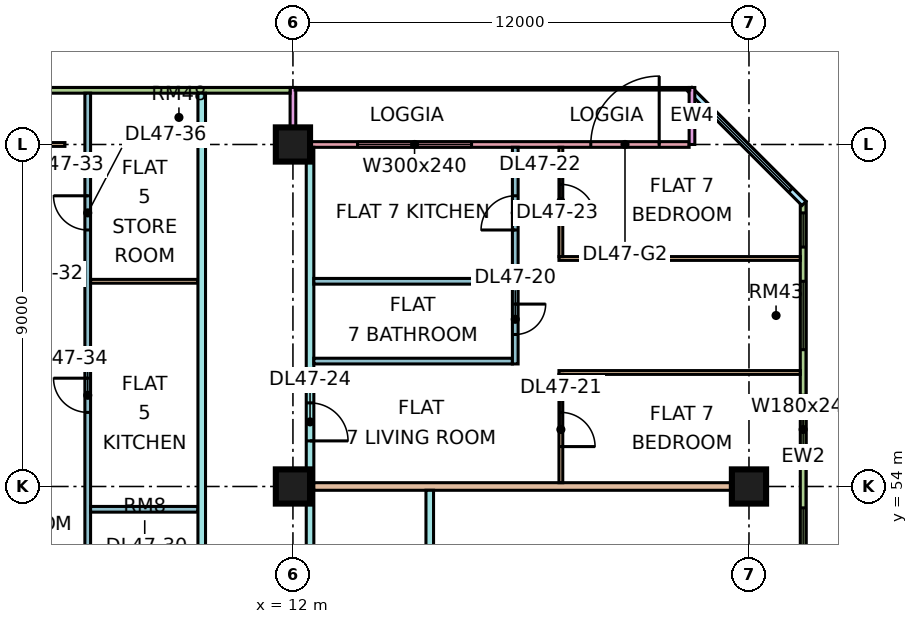
"""IFC4 building model, lengths in metres.
Left out: names, types, materials, properties, quantities, classifications, styles, units other than length and angle.
Written with IfcOpenShell. Run it as: python <this file> out.ifc"""

import sys

from ifc_helpers import new_model, si_unit, direction, frame, frame_2d, origin, origin_2d, place, context, subcontext, project, spatial, rectangle, extrude, element, fill, save


model = new_model("IFC4")
c1 = context("Model", 3, precision=1e-05, world=origin(), true_north=direction((0.0, 1.0)))
c2 = subcontext(c1, "Body", "Model", "MODEL_VIEW")
j1 = project(units=[si_unit("LENGTHUNIT", "METRE"), si_unit("PLANEANGLEUNIT", "RADIAN")], contexts=[c1])
p1 = place(None, origin())
s1 = spatial("IfcSite", under=j1, at=p1, CompositionType="ELEMENT")
p2 = place(p1, origin())
s2 = spatial("IfcBuilding", under=s1, at=p2, CompositionType="ELEMENT")
p3 = place(p2, frame((0.0, 0.0, 202.4)))
s3 = spatial("IfcBuildingStorey", under=s2, at=p3, CompositionType="ELEMENT", Elevation=202.4)
for number, where, z_axis, x_axis in (
    (1, (12.0, 54.0, 0.0), (0.0, 0.0, 1.0), (1.0, 0.0, 0.0)),
    (2, (12.0, 63.0, 0.0), (0.0, 0.0, 1.0), (1.0, 0.0, 0.0)),
    (3, (24.0, 54.0, 0.0), (0.0, 0.0, 1.0), (1.0, 0.0, 0.0)),
):
    element("IfcColumn", number, at=place(p3, frame(where, z_axis=z_axis, x_axis=x_axis)), inside=s3, PredefinedType="COLUMN", context=c2, shape_type="SweptSolid", body=[
        extrude(rectangle(XDim=0.9, YDim=0.9, at=origin_2d()), origin(), (0.0, 0.0, 1.0), 3.75),
    ])
p4 = place(p3, frame((25.425, 48.075, 0.0), z_axis=(0.0, 0.0, 1.0), x_axis=(0.0, 1.0, 0.0)))
e4 = element("IfcWall", 4, at=p4, inside=s3, PredefinedType="SOLIDWALL", context=c2, shape_type="SweptSolid", body=[
    extrude(rectangle(XDim=13.425, YDim=0.15, at=frame_2d((6.712, 0.0))), origin(), (0.0, 0.0, 1.0), 3.3),
])
p5 = place(p4, frame((0.562, 0.0, 0.45)))
e5 = element("IfcOpeningElement", 5, at=p5, cuts=e4, PredefinedType="OPENING", context=c2, shape_type="SweptSolid", body=[
    extrude(rectangle(XDim=4.8, YDim=2.4, at=frame_2d((2.4, 1.2))), frame((0.0, 0.085, 0.0), z_axis=(0.0, -1.0, 0.0), x_axis=(1.0, 0.0, 0.0)), (0.0, 0.0, 1.0), 0.17),
])
p6 = place(p4, frame((6.525, 0.0, 0.45)))
e6 = element("IfcOpeningElement", 6, at=p6, cuts=e4, PredefinedType="OPENING", context=c2, shape_type="SweptSolid", body=[
    extrude(rectangle(XDim=1.8, YDim=2.4, at=frame_2d((0.9, 1.2))), frame((0.0, 0.085, 0.0), z_axis=(0.0, -1.0, 0.0), x_axis=(1.0, 0.0, 0.0)), (0.0, 0.0, 1.0), 0.17),
])
p7 = place(p4, frame((9.525, 0.0, 0.45)))
e7 = element("IfcOpeningElement", 7, at=p7, cuts=e4, PredefinedType="OPENING", context=c2, shape_type="SweptSolid", body=[
    extrude(rectangle(XDim=1.8, YDim=2.4, at=frame_2d((0.9, 1.2))), frame((0.0, 0.085, 0.0), z_axis=(0.0, -1.0, 0.0), x_axis=(1.0, 0.0, 0.0)), (0.0, 0.0, 1.0), 0.17),
])
p8 = place(p4, frame((12.225, 0.0, 0.45)))
e8 = element("IfcOpeningElement", 8, at=p8, cuts=e4, PredefinedType="OPENING", context=c2, shape_type="SweptSolid", body=[
    extrude(rectangle(XDim=0.9, YDim=2.4, at=frame_2d((0.45, 1.2))), frame((0.0, 0.085, 0.0), z_axis=(0.0, -1.0, 0.0), x_axis=(1.0, 0.0, 0.0)), (0.0, 0.0, 1.0), 0.17),
])
p9 = place(p3, frame((25.447, 61.447, 0.0), z_axis=(0.0, 0.0, 1.0), x_axis=(-0.707106781187, 0.707106781187, 0.0)))
e9 = element("IfcWall", 9, at=p9, inside=s3, PredefinedType="SOLIDWALL", context=c2, shape_type="SweptSolid", body=[
    extrude(rectangle(XDim=4.243, YDim=0.15, at=frame_2d((2.121, 0.0))), origin(), (0.0, 0.0, 1.0), 3.3),
])
p10 = place(p9, frame((0.498, 0.0, 0.45)))
e10 = element("IfcOpeningElement", 10, at=p10, cuts=e9, PredefinedType="OPENING", context=c2, shape_type="SweptSolid", body=[
    extrude(rectangle(XDim=3.0, YDim=2.4, at=frame_2d((1.5, 1.2))), frame((0.0, 0.085, 0.0), z_axis=(0.0, -1.0, 0.0), x_axis=(1.0, 0.0, 0.0)), (0.0, 0.0, 1.0), 0.17),
])
p11 = place(p3, frame((22.425, 63.0, 0.0), z_axis=(0.0, 0.0, 1.0), x_axis=(-1.0, 0.0, 0.0)))
e11 = element("IfcWall", 11, at=p11, inside=s3, PredefinedType="SOLIDWALL", context=c2, shape_type="SweptSolid", body=[
    extrude(rectangle(XDim=10.35, YDim=0.15, at=frame_2d((5.175, 0.0))), origin(), (0.0, 0.0, 1.0), 3.3),
])
p12 = place(p11, frame((0.788, 0.0, 0.0)))
e12 = element("IfcOpeningElement", 12, at=p12, cuts=e11, PredefinedType="OPENING", context=c2, shape_type="SweptSolid", body=[
    extrude(rectangle(XDim=1.8, YDim=2.4, at=frame_2d((0.9, 1.2))), frame((0.0, 0.085, 0.0), z_axis=(0.0, -1.0, 0.0), x_axis=(1.0, 0.0, 0.0)), (0.0, 0.0, 1.0), 0.17),
])
p13 = place(p11, frame((5.725, 0.0, 0.45)))
e13 = element("IfcOpeningElement", 13, at=p13, cuts=e11, PredefinedType="OPENING", context=c2, shape_type="SweptSolid", body=[
    extrude(rectangle(XDim=3.0, YDim=2.4, at=frame_2d((1.5, 1.2))), frame((0.0, 0.085, 0.0), z_axis=(0.0, -1.0, 0.0), x_axis=(1.0, 0.0, 0.0)), (0.0, 0.0, 1.0), 0.17),
])
for number, where, z_axis, x_axis in (
    (14, (22.5, 64.5, 0.0), (0.0, 0.0, 1.0), (0.0, -1.0, 0.0)),
    (15, (12.0, 64.5, 0.0), (0.0, 0.0, 1.0), (0.0, -1.0, 0.0)),
):
    element("IfcWall", number, at=place(p3, frame(where, z_axis=z_axis, x_axis=x_axis)), inside=s3, PredefinedType="SOLIDWALL", context=c2, shape_type="SweptSolid", body=[
        extrude(rectangle(XDim=1.5, YDim=0.15, at=frame_2d((0.75, 0.0))), origin(), (0.0, 0.0, 1.0), 3.3),
    ])
p14 = place(p3, frame((11.925, 64.425, 0.0), z_axis=(0.0, 0.0, 1.0), x_axis=(-1.0, 0.0, 0.0)))
e16 = element("IfcWall", 16, at=p14, inside=s3, PredefinedType="SOLIDWALL", context=c2, shape_type="SweptSolid", body=[
    extrude(rectangle(XDim=10.425, YDim=0.15, at=frame_2d((5.212, 0.0))), origin(), (0.0, 0.0, 1.0), 3.3),
])
p15 = place(p14, frame((6.675, 0.0, 0.45)))
e17 = element("IfcOpeningElement", 17, at=p15, cuts=e16, PredefinedType="OPENING", context=c2, shape_type="SweptSolid", body=[
    extrude(rectangle(XDim=3.0, YDim=2.4, at=frame_2d((1.5, 1.2))), frame((0.0, 0.085, 0.0), z_axis=(0.0, -1.0, 0.0), x_axis=(1.0, 0.0, 0.0)), (0.0, 0.0, 1.0), 0.17),
])
p16 = place(p3, frame((5.45, 63.0, 0.0), z_axis=(0.0, 0.0, 1.0), x_axis=(1.0, 0.0, 0.0)))
e18 = element("IfcWall", 18, at=p16, inside=s3, PredefinedType="PARTITIONING", context=c2, shape_type="SweptSolid", body=[
    extrude(rectangle(XDim=0.55, YDim=0.1, at=frame_2d((0.275, 0.0))), origin(), (0.0, 0.0, 1.0), 3.3),
])
p17 = place(p3, frame((6.6, 51.225, 0.0), z_axis=(0.0, 0.0, 1.0), x_axis=(0.0, 1.0, 0.0)))
e19 = element("IfcWall", 19, at=p17, inside=s3, PredefinedType="PARTITIONING", context=c2, shape_type="SweptSolid", body=[
    extrude(rectangle(XDim=13.125, YDim=0.15, at=frame_2d((6.562, 0.0))), origin(), (0.0, 0.0, 1.0), 3.3),
])
p18 = place(p17, frame((4.725, 0.0, 0.0)))
e20 = element("IfcOpeningElement", 20, at=p18, cuts=e19, PredefinedType="OPENING", context=c2, shape_type="SweptSolid", body=[
    extrude(rectangle(XDim=0.9, YDim=2.1, at=frame_2d((0.45, 1.05))), frame((0.0, 0.085, 0.0), z_axis=(0.0, -1.0, 0.0), x_axis=(1.0, 0.0, 0.0)), (0.0, 0.0, 1.0), 0.17),
])
p19 = place(p17, frame((9.525, 0.0, 0.0)))
e21 = element("IfcOpeningElement", 21, at=p19, cuts=e19, PredefinedType="OPENING", context=c2, shape_type="SweptSolid", body=[
    extrude(rectangle(XDim=0.9, YDim=2.1, at=frame_2d((0.45, 1.05))), frame((0.0, 0.085, 0.0), z_axis=(0.0, -1.0, 0.0), x_axis=(1.0, 0.0, 0.0)), (0.0, 0.0, 1.0), 0.17),
])
p20 = place(p3, frame((6.675, 53.4, 0.0), z_axis=(0.0, 0.0, 1.0), x_axis=(1.0, 0.0, 0.0)))
e22 = element("IfcWall", 22, at=p20, inside=s3, PredefinedType="PARTITIONING", context=c2, shape_type="SweptSolid", body=[
    extrude(rectangle(XDim=2.825, YDim=0.15, at=frame_2d((1.413, 0.0))), origin(), (0.0, 0.0, 1.0), 3.3),
])
p21 = place(p3, frame((6.675, 59.4, 0.0), z_axis=(0.0, 0.0, 1.0), x_axis=(1.0, 0.0, 0.0)))
e23 = element("IfcWall", 23, at=p21, inside=s3, PredefinedType="PARTITIONING", context=c2, shape_type="SweptSolid", body=[
    extrude(rectangle(XDim=2.825, YDim=0.1, at=frame_2d((1.413, 0.0))), origin(), (0.0, 0.0, 1.0), 3.3),
])
p22 = place(p3, frame((9.6, 20.0, 0.0), z_axis=(0.0, 0.0, 1.0), x_axis=(0.0, 1.0, 0.0)))
e24 = element("IfcWall", 24, at=p22, inside=s3, PredefinedType="PARTITIONING", context=c2, shape_type="SweptSolid", body=[
    extrude(rectangle(XDim=44.35, YDim=0.2, at=frame_2d((22.175, 0.0))), origin(), (0.0, 0.0, 1.0), 3.3),
])
p23 = place(p22, frame((17.1, 0.0, 0.0)))
e25 = element("IfcOpeningElement", 25, at=p23, cuts=e24, PredefinedType="OPENING", context=c2, shape_type="SweptSolid", body=[
    extrude(rectangle(XDim=1.0, YDim=2.1, at=frame_2d((0.5, 1.05))), frame((0.0, 0.11, 0.0), z_axis=(0.0, -1.0, 0.0), x_axis=(1.0, 0.0, 0.0)), (0.0, 0.0, 1.0), 0.22),
])
p24 = place(p22, frame((29.1, 0.0, 0.0)))
e26 = element("IfcOpeningElement", 26, at=p24, cuts=e24, PredefinedType="OPENING", context=c2, shape_type="SweptSolid", body=[
    extrude(rectangle(XDim=1.0, YDim=2.1, at=frame_2d((0.5, 1.05))), frame((0.0, 0.11, 0.0), z_axis=(0.0, -1.0, 0.0), x_axis=(1.0, 0.0, 0.0)), (0.0, 0.0, 1.0), 0.22),
])
p25 = place(p22, frame((0.6, 0.0, 0.0)))
e27 = element("IfcOpeningElement", 27, at=p25, cuts=e24, PredefinedType="OPENING", context=c2, shape_type="SweptSolid", body=[
    extrude(rectangle(XDim=1.2, YDim=2.1, at=frame_2d((0.6, 1.05))), frame((0.0, 0.11, 0.0), z_axis=(0.0, -1.0, 0.0), x_axis=(1.0, 0.0, 0.0)), (0.0, 0.0, 1.0), 0.22),
])
p26 = place(p22, frame((4.35, 0.0, 0.0)))
e28 = element("IfcOpeningElement", 28, at=p26, cuts=e24, PredefinedType="OPENING", context=c2, shape_type="SweptSolid", body=[
    extrude(rectangle(XDim=1.0, YDim=2.1, at=frame_2d((0.5, 1.05))), frame((0.0, 0.11, 0.0), z_axis=(0.0, -1.0, 0.0), x_axis=(1.0, 0.0, 0.0)), (0.0, 0.0, 1.0), 0.22),
])
p27 = place(p3, frame((12.45, 20.0, 0.0), z_axis=(0.0, 0.0, 1.0), x_axis=(0.0, 1.0, 0.0)))
e29 = element("IfcWall", 29, at=p27, inside=s3, PredefinedType="PARTITIONING", context=c2, shape_type="SweptSolid", body=[
    extrude(rectangle(XDim=42.926, YDim=0.2, at=frame_2d((21.463, 0.0))), origin(), (0.0, 0.0, 1.0), 3.3),
])
p28 = place(p27, frame((7.15, 0.0, 0.0)))
e30 = element("IfcOpeningElement", 30, at=p28, cuts=e29, PredefinedType="OPENING", context=c2, shape_type="SweptSolid", body=[
    extrude(rectangle(XDim=1.6, YDim=2.1, at=frame_2d((0.8, 1.05))), frame((0.0, 0.11, 0.0), z_axis=(0.0, -1.0, 0.0), x_axis=(1.0, 0.0, 0.0)), (0.0, 0.0, 1.0), 0.22),
])
p29 = place(p27, frame((13.5, 0.0, 0.0)))
e31 = element("IfcOpeningElement", 31, at=p29, cuts=e29, PredefinedType="OPENING", context=c2, shape_type="SweptSolid", body=[
    extrude(rectangle(XDim=1.0, YDim=2.1, at=frame_2d((0.5, 1.05))), frame((0.0, 0.11, 0.0), z_axis=(0.0, -1.0, 0.0), x_axis=(1.0, 0.0, 0.0)), (0.0, 0.0, 1.0), 0.22),
])
p30 = place(p27, frame((17.2, 0.0, 0.0)))
e32 = element("IfcOpeningElement", 32, at=p30, cuts=e29, PredefinedType="OPENING", context=c2, shape_type="SweptSolid", body=[
    extrude(rectangle(XDim=1.0, YDim=2.1, at=frame_2d((0.5, 1.05))), frame((0.0, 0.11, 0.0), z_axis=(0.0, -1.0, 0.0), x_axis=(1.0, 0.0, 0.0)), (0.0, 0.0, 1.0), 0.22),
])
p31 = place(p27, frame((35.2, 0.0, 0.0)))
e33 = element("IfcOpeningElement", 33, at=p31, cuts=e29, PredefinedType="OPENING", context=c2, shape_type="SweptSolid", body=[
    extrude(rectangle(XDim=1.0, YDim=2.1, at=frame_2d((0.5, 1.05))), frame((0.0, 0.11, 0.0), z_axis=(0.0, -1.0, 0.0), x_axis=(1.0, 0.0, 0.0)), (0.0, 0.0, 1.0), 0.22),
])
p32 = place(p27, frame((1.15, 0.0, 0.0)))
e34 = element("IfcOpeningElement", 34, at=p32, cuts=e29, PredefinedType="OPENING", context=c2, shape_type="SweptSolid", body=[
    extrude(rectangle(XDim=1.8, YDim=2.1, at=frame_2d((0.9, 1.05))), frame((0.0, 0.11, 0.0), z_axis=(0.0, -1.0, 0.0), x_axis=(1.0, 0.0, 0.0)), (0.0, 0.0, 1.0), 0.22),
])
p33 = place(p27, frame((28.6, 0.0, 0.0)))
e35 = element("IfcOpeningElement", 35, at=p33, cuts=e29, PredefinedType="OPENING", context=c2, shape_type="SweptSolid", body=[
    extrude(rectangle(XDim=1.8, YDim=2.1, at=frame_2d((0.9, 1.05))), frame((0.0, 0.11, 0.0), z_axis=(0.0, -1.0, 0.0), x_axis=(1.0, 0.0, 0.0)), (0.0, 0.0, 1.0), 0.22),
])
p34 = place(p3, frame((12.55, 54.0, 0.0), z_axis=(0.0, 0.0, 1.0), x_axis=(1.0, 0.0, 0.0)))
e36 = element("IfcWall", 36, at=p34, inside=s3, PredefinedType="PARTITIONING", context=c2, shape_type="SweptSolid", body=[
    extrude(rectangle(XDim=11.45, YDim=0.2, at=frame_2d((5.725, 0.0))), origin(), (0.0, 0.0, 1.0), 3.3),
])
for number, where, z_axis, x_axis in (
    (37, (12.55, 57.3, 0.0), (0.0, 0.0, 1.0), (1.0, 0.0, 0.0)),
    (38, (12.55, 59.4, 0.0), (0.0, 0.0, 1.0), (1.0, 0.0, 0.0)),
):
    element("IfcWall", number, at=place(p3, frame(where, z_axis=z_axis, x_axis=x_axis)), inside=s3, PredefinedType="PARTITIONING", context=c2, shape_type="SweptSolid", body=[
        extrude(rectangle(XDim=5.225, YDim=0.15, at=frame_2d((2.612, 0.0))), origin(), (0.0, 0.0, 1.0), 3.3),
    ])
p35 = place(p3, frame((15.6, 51.225, 0.0), z_axis=(0.0, 0.0, 1.0), x_axis=(0.0, 1.0, 0.0)))
e39 = element("IfcWall", 39, at=p35, inside=s3, PredefinedType="PARTITIONING", context=c2, shape_type="SweptSolid", body=[
    extrude(rectangle(XDim=2.675, YDim=0.2, at=frame_2d((1.337, 0.0))), origin(), (0.0, 0.0, 1.0), 3.3),
])
p36 = place(p3, frame((17.85, 57.225, 0.0), z_axis=(0.0, 0.0, 1.0), x_axis=(0.0, 1.0, 0.0)))
e40 = element("IfcWall", 40, at=p36, inside=s3, PredefinedType="PARTITIONING", context=c2, shape_type="SweptSolid", body=[
    extrude(rectangle(XDim=5.701, YDim=0.15, at=frame_2d((2.851, 0.0))), origin(), (0.0, 0.0, 1.0), 3.3),
])
p37 = place(p36, frame((0.775, 0.0, 0.0)))
e41 = element("IfcOpeningElement", 41, at=p37, cuts=e40, PredefinedType="OPENING", context=c2, shape_type="SweptSolid", body=[
    extrude(rectangle(XDim=0.8, YDim=2.1, at=frame_2d((0.4, 1.05))), frame((0.0, 0.085, 0.0), z_axis=(0.0, -1.0, 0.0), x_axis=(1.0, 0.0, 0.0)), (0.0, 0.0, 1.0), 0.17),
])
p38 = place(p36, frame((3.525, 0.0, 0.0)))
e42 = element("IfcOpeningElement", 42, at=p38, cuts=e40, PredefinedType="OPENING", context=c2, shape_type="SweptSolid", body=[
    extrude(rectangle(XDim=0.9, YDim=2.1, at=frame_2d((0.45, 1.05))), frame((0.0, 0.085, 0.0), z_axis=(0.0, -1.0, 0.0), x_axis=(1.0, 0.0, 0.0)), (0.0, 0.0, 1.0), 0.17),
])
for number, where, z_axis, x_axis in (
    (43, (19.0, 57.0, 0.0), (0.0, 0.0, 1.0), (1.0, 0.0, 0.0)),
    (44, (19.0, 60.0, 0.0), (0.0, 0.0, 1.0), (1.0, 0.0, 0.0)),
):
    element("IfcWall", number, at=place(p3, frame(where, z_axis=z_axis, x_axis=x_axis)), inside=s3, PredefinedType="PARTITIONING", context=c2, shape_type="SweptSolid", body=[
        extrude(rectangle(XDim=6.35, YDim=0.1, at=frame_2d((3.175, 0.0))), origin(), (0.0, 0.0, 1.0), 3.3),
    ])
p39 = place(p3, frame((19.05, 54.1, 0.0), z_axis=(0.0, 0.0, 1.0), x_axis=(0.0, 1.0, 0.0)))
e45 = element("IfcWall", 45, at=p39, inside=s3, PredefinedType="PARTITIONING", context=c2, shape_type="SweptSolid", body=[
    extrude(rectangle(XDim=2.85, YDim=0.1, at=frame_2d((1.425, 0.0))), origin(), (0.0, 0.0, 1.0), 3.3),
])
p40 = place(p39, frame((0.95, 0.0, 0.0)))
e46 = element("IfcOpeningElement", 46, at=p40, cuts=e45, PredefinedType="OPENING", context=c2, shape_type="SweptSolid", body=[
    extrude(rectangle(XDim=0.9, YDim=2.1, at=frame_2d((0.45, 1.05))), frame((0.0, 0.06, 0.0), z_axis=(0.0, -1.0, 0.0), x_axis=(1.0, 0.0, 0.0)), (0.0, 0.0, 1.0), 0.12),
])
p41 = place(p3, frame((19.05, 60.05, 0.0), z_axis=(0.0, 0.0, 1.0), x_axis=(0.0, 1.0, 0.0)))
e47 = element("IfcWall", 47, at=p41, inside=s3, PredefinedType="PARTITIONING", context=c2, shape_type="SweptSolid", body=[
    extrude(rectangle(XDim=2.876, YDim=0.1, at=frame_2d((1.438, 0.0))), origin(), (0.0, 0.0, 1.0), 3.3),
])
p42 = place(p41, frame((1.0, 0.0, 0.0)))
e48 = element("IfcOpeningElement", 48, at=p42, cuts=e47, PredefinedType="OPENING", context=c2, shape_type="SweptSolid", body=[
    extrude(rectangle(XDim=0.9, YDim=2.1, at=frame_2d((0.45, 1.05))), frame((0.0, 0.06, 0.0), z_axis=(0.0, -1.0, 0.0), x_axis=(1.0, 0.0, 0.0)), (0.0, 0.0, 1.0), 0.12),
])
p43 = place(p5, origin())
e49 = element("IfcWindow", 49, at=p43, inside=s3, PartitioningType="SINGLE_PANEL", PredefinedType="WINDOW", context=c2, shape_type="SweptSolid", body=[
    extrude(rectangle(XDim=4.8, YDim=2.4, at=frame_2d((2.4, 1.2))), frame((0.0, 0.03, 0.0), z_axis=(0.0, -1.0, 0.0), x_axis=(1.0, 0.0, 0.0)), (0.0, 0.0, 1.0), 0.06),
])
fill(e5, e49)
p44 = place(p6, origin())
e50 = element("IfcWindow", 50, at=p44, inside=s3, PartitioningType="SINGLE_PANEL", PredefinedType="WINDOW", context=c2, shape_type="SweptSolid", body=[
    extrude(rectangle(XDim=1.8, YDim=2.4, at=frame_2d((0.9, 1.2))), frame((0.0, 0.03, 0.0), z_axis=(0.0, -1.0, 0.0), x_axis=(1.0, 0.0, 0.0)), (0.0, 0.0, 1.0), 0.06),
])
fill(e6, e50)
p45 = place(p7, origin())
e51 = element("IfcWindow", 51, at=p45, inside=s3, PartitioningType="SINGLE_PANEL", PredefinedType="WINDOW", context=c2, shape_type="SweptSolid", body=[
    extrude(rectangle(XDim=1.8, YDim=2.4, at=frame_2d((0.9, 1.2))), frame((0.0, 0.03, 0.0), z_axis=(0.0, -1.0, 0.0), x_axis=(1.0, 0.0, 0.0)), (0.0, 0.0, 1.0), 0.06),
])
fill(e7, e51)
p46 = place(p8, origin())
e52 = element("IfcWindow", 52, at=p46, inside=s3, PartitioningType="SINGLE_PANEL", PredefinedType="WINDOW", context=c2, shape_type="SweptSolid", body=[
    extrude(rectangle(XDim=0.9, YDim=2.4, at=frame_2d((0.45, 1.2))), frame((0.0, 0.03, 0.0), z_axis=(0.0, -1.0, 0.0), x_axis=(1.0, 0.0, 0.0)), (0.0, 0.0, 1.0), 0.06),
])
fill(e8, e52)
p47 = place(p10, origin())
e53 = element("IfcWindow", 53, at=p47, inside=s3, PartitioningType="SINGLE_PANEL", PredefinedType="WINDOW", context=c2, shape_type="SweptSolid", body=[
    extrude(rectangle(XDim=3.0, YDim=2.4, at=frame_2d((1.5, 1.2))), frame((0.0, 0.03, 0.0), z_axis=(0.0, -1.0, 0.0), x_axis=(1.0, 0.0, 0.0)), (0.0, 0.0, 1.0), 0.06),
])
fill(e10, e53)
p48 = place(p12, frame((1.8, 0.0, 0.0), z_axis=(0.0, 0.0, 1.0), x_axis=(-1.0, 0.0, 0.0)))
e54 = element("IfcDoor", 54, at=p48, inside=s3, OperationType="DOUBLE_DOOR_SINGLE_SWING", PredefinedType="DOOR", context=c2, shape_type="SweptSolid", body=[
    extrude(rectangle(XDim=1.8, YDim=2.4, at=frame_2d((0.9, 1.2))), frame((0.0, 0.025, 0.0), z_axis=(0.0, -1.0, 0.0), x_axis=(1.0, 0.0, 0.0)), (0.0, 0.0, 1.0), 0.05),
])
fill(e12, e54)
p49 = place(p13, origin())
e55 = element("IfcWindow", 55, at=p49, inside=s3, PartitioningType="SINGLE_PANEL", PredefinedType="WINDOW", context=c2, shape_type="SweptSolid", body=[
    extrude(rectangle(XDim=3.0, YDim=2.4, at=frame_2d((1.5, 1.2))), frame((0.0, 0.03, 0.0), z_axis=(0.0, -1.0, 0.0), x_axis=(1.0, 0.0, 0.0)), (0.0, 0.0, 1.0), 0.06),
])
fill(e13, e55)
p50 = place(p37, origin())
e56 = element("IfcDoor", 56, at=p50, inside=s3, OperationType="SINGLE_SWING_RIGHT", PredefinedType="DOOR", context=c2, shape_type="SweptSolid", body=[
    extrude(rectangle(XDim=0.8, YDim=2.1, at=frame_2d((0.4, 1.05))), frame((0.0, 0.025, 0.0), z_axis=(0.0, -1.0, 0.0), x_axis=(1.0, 0.0, 0.0)), (0.0, 0.0, 1.0), 0.05),
])
fill(e41, e56)
p51 = place(p40, frame((0.9, 0.0, 0.0), z_axis=(0.0, 0.0, 1.0), x_axis=(-1.0, 0.0, 0.0)))
e57 = element("IfcDoor", 57, at=p51, inside=s3, OperationType="SINGLE_SWING_LEFT", PredefinedType="DOOR", context=c2, shape_type="SweptSolid", body=[
    extrude(rectangle(XDim=0.9, YDim=2.1, at=frame_2d((0.45, 1.05))), frame((0.0, 0.025, 0.0), z_axis=(0.0, -1.0, 0.0), x_axis=(1.0, 0.0, 0.0)), (0.0, 0.0, 1.0), 0.05),
])
fill(e46, e57)
p52 = place(p42, frame((0.9, 0.0, 0.0), z_axis=(0.0, 0.0, 1.0), x_axis=(-1.0, 0.0, 0.0)))
e58 = element("IfcDoor", 58, at=p52, inside=s3, OperationType="SINGLE_SWING_LEFT", PredefinedType="DOOR", context=c2, shape_type="SweptSolid", body=[
    extrude(rectangle(XDim=0.9, YDim=2.1, at=frame_2d((0.45, 1.05))), frame((0.0, 0.025, 0.0), z_axis=(0.0, -1.0, 0.0), x_axis=(1.0, 0.0, 0.0)), (0.0, 0.0, 1.0), 0.05),
])
fill(e48, e58)
p53 = place(p38, origin())
e59 = element("IfcDoor", 59, at=p53, inside=s3, OperationType="SINGLE_SWING_LEFT", PredefinedType="DOOR", context=c2, shape_type="SweptSolid", body=[
    extrude(rectangle(XDim=0.9, YDim=2.1, at=frame_2d((0.45, 1.05))), frame((0.0, 0.025, 0.0), z_axis=(0.0, -1.0, 0.0), x_axis=(1.0, 0.0, 0.0)), (0.0, 0.0, 1.0), 0.05),
])
fill(e42, e59)
p54 = place(p31, frame((1.0, 0.0, 0.0), z_axis=(0.0, 0.0, 1.0), x_axis=(-1.0, 0.0, 0.0)))
e60 = element("IfcDoor", 60, at=p54, inside=s3, OperationType="SINGLE_SWING_LEFT", PredefinedType="DOOR", context=c2, shape_type="SweptSolid", body=[
    extrude(rectangle(XDim=1.0, YDim=2.1, at=frame_2d((0.5, 1.05))), frame((0.0, 0.025, 0.0), z_axis=(0.0, -1.0, 0.0), x_axis=(1.0, 0.0, 0.0)), (0.0, 0.0, 1.0), 0.05),
])
fill(e33, e60)
p55 = place(p18, frame((0.9, 0.0, 0.0), z_axis=(0.0, 0.0, 1.0), x_axis=(-1.0, 0.0, 0.0)))
e61 = element("IfcDoor", 61, at=p55, inside=s3, OperationType="SINGLE_SWING_RIGHT", PredefinedType="DOOR", context=c2, shape_type="SweptSolid", body=[
    extrude(rectangle(XDim=0.9, YDim=2.1, at=frame_2d((0.45, 1.05))), frame((0.0, 0.025, 0.0), z_axis=(0.0, -1.0, 0.0), x_axis=(1.0, 0.0, 0.0)), (0.0, 0.0, 1.0), 0.05),
])
fill(e20, e61)
p56 = place(p19, frame((0.9, 0.0, 0.0), z_axis=(0.0, 0.0, 1.0), x_axis=(-1.0, 0.0, 0.0)))
e62 = element("IfcDoor", 62, at=p56, inside=s3, OperationType="SINGLE_SWING_RIGHT", PredefinedType="DOOR", context=c2, shape_type="SweptSolid", body=[
    extrude(rectangle(XDim=0.9, YDim=2.1, at=frame_2d((0.45, 1.05))), frame((0.0, 0.025, 0.0), z_axis=(0.0, -1.0, 0.0), x_axis=(1.0, 0.0, 0.0)), (0.0, 0.0, 1.0), 0.05),
])
fill(e21, e62)
save(model, sys.argv[1])
